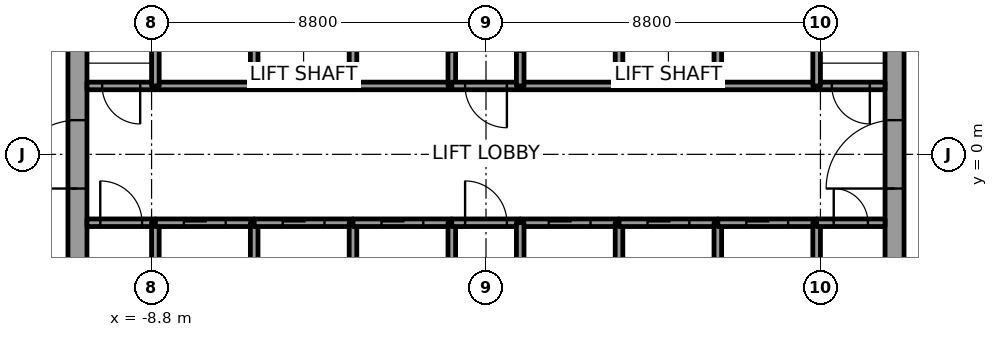
"""IFC4 building model, lengths in metres.
Left out: names, types, materials, properties, quantities, classifications, styles, units other than length and angle.
Written with IfcOpenShell. Run it as: python <this file> out.ifc"""

import sys

from ifc_helpers import new_model, si_unit, direction, frame, frame_2d, origin, place, context, subcontext, project, spatial, rectangle, extrude, element, fill, save


model = new_model("IFC4")
c1 = context("Model", 3, precision=1e-05, world=origin(), true_north=direction((0.0, 1.0)))
c2 = subcontext(c1, "Body", "Model", "MODEL_VIEW")
j1 = project(units=[si_unit("LENGTHUNIT", "METRE"), si_unit("PLANEANGLEUNIT", "RADIAN")], contexts=[c1])
p1 = place(None, origin())
s1 = spatial("IfcSite", under=j1, at=p1, CompositionType="ELEMENT")
p2 = place(p1, origin())
s2 = spatial("IfcBuilding", under=s1, at=p2, CompositionType="ELEMENT")
p3 = place(p2, frame((0.0, 0.0, 181.8)))
s3 = spatial("IfcBuildingStorey", under=s2, at=p3, CompositionType="ELEMENT", Elevation=181.8)
p4 = place(p3, frame((-10.75, -7.5, 0.0), z_axis=(0.0, 0.0, 1.0), x_axis=(0.0, 1.0, 0.0)))
e1 = element("IfcWall", 1, at=p4, inside=s3, PredefinedType="SHEAR", context=c2, shape_type="SweptSolid", body=[
    extrude(rectangle(XDim=15.0, YDim=0.5, at=frame_2d((7.5, 0.0))), origin(), (0.0, 0.0, 1.0), 4.0),
])
p5 = place(p4, frame((6.6, 0.0, 0.0)))
e2 = element("IfcOpeningElement", 2, at=p5, cuts=e1, PredefinedType="OPENING", context=c2, shape_type="SweptSolid", body=[
    extrude(rectangle(XDim=1.8, YDim=2.1, at=frame_2d((0.9, 1.05))), frame((0.0, 0.25, 0.0), z_axis=(0.0, -1.0, 0.0), x_axis=(1.0, 0.0, 0.0)), (0.0, 0.0, 1.0), 0.5),
])
p6 = place(p3, frame((10.75, -7.5, 0.0), z_axis=(0.0, 0.0, 1.0), x_axis=(0.0, 1.0, 0.0)))
e3 = element("IfcWall", 3, at=p6, inside=s3, PredefinedType="SHEAR", context=c2, shape_type="SweptSolid", body=[
    extrude(rectangle(XDim=15.0, YDim=0.5, at=frame_2d((7.5, 0.0))), origin(), (0.0, 0.0, 1.0), 4.0),
])
p7 = place(p6, frame((6.6, 0.0, 0.0)))
e4 = element("IfcOpeningElement", 4, at=p7, cuts=e3, PredefinedType="OPENING", context=c2, shape_type="SweptSolid", body=[
    extrude(rectangle(XDim=1.8, YDim=2.1, at=frame_2d((0.9, 1.05))), frame((0.0, 0.25, 0.0), z_axis=(0.0, -1.0, 0.0), x_axis=(1.0, 0.0, 0.0)), (0.0, 0.0, 1.0), 0.5),
])
p8 = place(p3, frame((-10.5, -1.8, 0.0), z_axis=(0.0, 0.0, 1.0), x_axis=(1.0, 0.0, 0.0)))
e5 = element("IfcWall", 5, at=p8, inside=s3, PredefinedType="SOLIDWALL", context=c2, shape_type="SweptSolid", body=[
    extrude(rectangle(XDim=1.8, YDim=0.2, at=frame_2d((0.9, 0.0))), origin(), (0.0, 0.0, 1.0), 3.85),
])
p9 = place(p8, frame((0.35, 0.0, 0.0)))
e6 = element("IfcOpeningElement", 6, at=p9, cuts=e5, PredefinedType="OPENING", context=c2, shape_type="SweptSolid", body=[
    extrude(rectangle(XDim=1.1, YDim=2.1, at=frame_2d((0.55, 1.05))), frame((0.0, 0.1, 0.0), z_axis=(0.0, -1.0, 0.0), x_axis=(1.0, 0.0, 0.0)), (0.0, 0.0, 1.0), 0.2),
])
p10 = place(p3, frame((-8.7, 1.8, 0.0), z_axis=(0.0, 0.0, 1.0), x_axis=(-1.0, 0.0, 0.0)))
e7 = element("IfcWall", 7, at=p10, inside=s3, PredefinedType="SOLIDWALL", context=c2, shape_type="SweptSolid", body=[
    extrude(rectangle(XDim=1.8, YDim=0.2, at=frame_2d((0.9, 0.0))), origin(), (0.0, 0.0, 1.0), 3.85),
])
p11 = place(p10, frame((0.4, 0.0, 0.0)))
e8 = element("IfcOpeningElement", 8, at=p11, cuts=e7, PredefinedType="OPENING", context=c2, shape_type="SweptSolid", body=[
    extrude(rectangle(XDim=1.0, YDim=2.1, at=frame_2d((0.5, 1.05))), frame((0.0, 0.1, 0.0), z_axis=(0.0, -1.0, 0.0), x_axis=(1.0, 0.0, 0.0)), (0.0, 0.0, 1.0), 0.2),
])
p12 = place(p3, frame((-8.7, -4.6, 0.0), z_axis=(0.0, 0.0, 1.0), x_axis=(0.0, 1.0, 0.0)))
e9 = element("IfcWall", 9, at=p12, inside=s3, PredefinedType="SOLIDWALL", context=c2, shape_type="SweptSolid", body=[
    extrude(rectangle(XDim=2.8, YDim=0.2, at=frame_2d((1.4, 0.0))), origin(), (0.0, 0.0, 1.0), 3.85),
])
p13 = place(p3, frame((-8.7, -1.8, 0.0), z_axis=(0.0, 0.0, 1.0), x_axis=(1.0, 0.0, 0.0)))
e10 = element("IfcWall", 10, at=p13, inside=s3, PredefinedType="SOLIDWALL", context=c2, shape_type="SweptSolid", body=[
    extrude(rectangle(XDim=2.6, YDim=0.2, at=frame_2d((1.3, 0.0))), origin(), (0.0, 0.0, 1.0), 3.85),
])
p14 = place(p13, frame((0.75, 0.0, 0.0)))
e11 = element("IfcOpeningElement", 11, at=p14, cuts=e10, PredefinedType="OPENING", context=c2, shape_type="SweptSolid", body=[
    extrude(rectangle(XDim=1.1, YDim=2.1, at=frame_2d((0.55, 1.05))), frame((0.0, 0.1, 0.0), z_axis=(0.0, -1.0, 0.0), x_axis=(1.0, 0.0, 0.0)), (0.0, 0.0, 1.0), 0.2),
])
p15 = place(p3, frame((-6.1, 1.8, 0.0), z_axis=(0.0, 0.0, 1.0), x_axis=(-1.0, 0.0, 0.0)))
e12 = element("IfcWall", 12, at=p15, inside=s3, PredefinedType="SOLIDWALL", context=c2, shape_type="SweptSolid", body=[
    extrude(rectangle(XDim=2.6, YDim=0.2, at=frame_2d((1.3, 0.0))), origin(), (0.0, 0.0, 1.0), 3.85),
])
for number, where, z_axis, x_axis in (
    (13, (-8.7, 1.8, 0.0), (0.0, 0.0, 1.0), (0.0, 1.0, 0.0)),
    (14, (-6.1, -4.6, 0.0), (0.0, 0.0, 1.0), (0.0, 1.0, 0.0)),
):
    element("IfcWall", number, at=place(p3, frame(where, z_axis=z_axis, x_axis=x_axis)), inside=s3, PredefinedType="SOLIDWALL", context=c2, shape_type="SweptSolid", body=[
        extrude(rectangle(XDim=2.8, YDim=0.2, at=frame_2d((1.4, 0.0))), origin(), (0.0, 0.0, 1.0), 3.85),
    ])
p16 = place(p3, frame((-6.1, -1.8, 0.0), z_axis=(0.0, 0.0, 1.0), x_axis=(1.0, 0.0, 0.0)))
e15 = element("IfcWall", 15, at=p16, inside=s3, PredefinedType="SOLIDWALL", context=c2, shape_type="SweptSolid", body=[
    extrude(rectangle(XDim=2.6, YDim=0.2, at=frame_2d((1.3, 0.0))), origin(), (0.0, 0.0, 1.0), 3.85),
])
p17 = place(p16, frame((0.75, 0.0, 0.0)))
e16 = element("IfcOpeningElement", 16, at=p17, cuts=e15, PredefinedType="OPENING", context=c2, shape_type="SweptSolid", body=[
    extrude(rectangle(XDim=1.1, YDim=2.1, at=frame_2d((0.55, 1.05))), frame((0.0, 0.1, 0.0), z_axis=(0.0, -1.0, 0.0), x_axis=(1.0, 0.0, 0.0)), (0.0, 0.0, 1.0), 0.2),
])
p18 = place(p3, frame((-3.5, 1.8, 0.0), z_axis=(0.0, 0.0, 1.0), x_axis=(-1.0, 0.0, 0.0)))
e17 = element("IfcWall", 17, at=p18, inside=s3, PredefinedType="SOLIDWALL", context=c2, shape_type="SweptSolid", body=[
    extrude(rectangle(XDim=2.6, YDim=0.2, at=frame_2d((1.3, 0.0))), origin(), (0.0, 0.0, 1.0), 3.85),
])
for number, where, z_axis, x_axis in (
    (18, (-6.1, 1.8, 0.0), (0.0, 0.0, 1.0), (0.0, 1.0, 0.0)),
    (19, (-3.5, -4.6, 0.0), (0.0, 0.0, 1.0), (0.0, 1.0, 0.0)),
):
    element("IfcWall", number, at=place(p3, frame(where, z_axis=z_axis, x_axis=x_axis)), inside=s3, PredefinedType="SOLIDWALL", context=c2, shape_type="SweptSolid", body=[
        extrude(rectangle(XDim=2.8, YDim=0.2, at=frame_2d((1.4, 0.0))), origin(), (0.0, 0.0, 1.0), 3.85),
    ])
p19 = place(p3, frame((-3.5, -1.8, 0.0), z_axis=(0.0, 0.0, 1.0), x_axis=(1.0, 0.0, 0.0)))
e20 = element("IfcWall", 20, at=p19, inside=s3, PredefinedType="SOLIDWALL", context=c2, shape_type="SweptSolid", body=[
    extrude(rectangle(XDim=2.6, YDim=0.2, at=frame_2d((1.3, 0.0))), origin(), (0.0, 0.0, 1.0), 3.85),
])
p20 = place(p19, frame((0.75, 0.0, 0.0)))
e21 = element("IfcOpeningElement", 21, at=p20, cuts=e20, PredefinedType="OPENING", context=c2, shape_type="SweptSolid", body=[
    extrude(rectangle(XDim=1.1, YDim=2.1, at=frame_2d((0.55, 1.05))), frame((0.0, 0.1, 0.0), z_axis=(0.0, -1.0, 0.0), x_axis=(1.0, 0.0, 0.0)), (0.0, 0.0, 1.0), 0.2),
])
p21 = place(p3, frame((-0.9, 1.8, 0.0), z_axis=(0.0, 0.0, 1.0), x_axis=(-1.0, 0.0, 0.0)))
e22 = element("IfcWall", 22, at=p21, inside=s3, PredefinedType="SOLIDWALL", context=c2, shape_type="SweptSolid", body=[
    extrude(rectangle(XDim=2.6, YDim=0.2, at=frame_2d((1.3, 0.0))), origin(), (0.0, 0.0, 1.0), 3.85),
])
p22 = place(p3, frame((-3.5, 4.6, 0.0), z_axis=(0.0, 0.0, 1.0), x_axis=(0.0, -1.0, 0.0)))
e23 = element("IfcWall", 23, at=p22, inside=s3, PredefinedType="SOLIDWALL", context=c2, shape_type="SweptSolid", body=[
    extrude(rectangle(XDim=2.8, YDim=0.2, at=frame_2d((1.4, 0.0))), origin(), (0.0, 0.0, 1.0), 3.85),
])
p23 = place(p3, frame((-0.9, 1.8, 0.0), z_axis=(0.0, 0.0, 1.0), x_axis=(0.0, 1.0, 0.0)))
e24 = element("IfcWall", 24, at=p23, inside=s3, PredefinedType="SOLIDWALL", context=c2, shape_type="SweptSolid", body=[
    extrude(rectangle(XDim=3.0, YDim=0.2, at=frame_2d((1.5, 0.0))), origin(), (0.0, 0.0, 1.0), 3.85),
])
p24 = place(p23, frame((0.9, 0.0, 0.0)))
e25 = element("IfcOpeningElement", 25, at=p24, cuts=e24, PredefinedType="OPENING", context=c2, shape_type="SweptSolid", body=[
    extrude(rectangle(XDim=1.2, YDim=2.1, at=frame_2d((0.6, 1.05))), frame((0.0, 0.1, 0.0), z_axis=(0.0, -1.0, 0.0), x_axis=(1.0, 0.0, 0.0)), (0.0, 0.0, 1.0), 0.2),
])
p25 = place(p3, frame((-0.9, -4.6, 0.0), z_axis=(0.0, 0.0, 1.0), x_axis=(0.0, 1.0, 0.0)))
e26 = element("IfcWall", 26, at=p25, inside=s3, PredefinedType="SOLIDWALL", context=c2, shape_type="SweptSolid", body=[
    extrude(rectangle(XDim=2.8, YDim=0.2, at=frame_2d((1.4, 0.0))), origin(), (0.0, 0.0, 1.0), 3.85),
])
p26 = place(p3, frame((-0.9, -1.8, 0.0), z_axis=(0.0, 0.0, 1.0), x_axis=(1.0, 0.0, 0.0)))
e27 = element("IfcWall", 27, at=p26, inside=s3, PredefinedType="SOLIDWALL", context=c2, shape_type="SweptSolid", body=[
    extrude(rectangle(XDim=1.8, YDim=0.2, at=frame_2d((0.9, 0.0))), origin(), (0.0, 0.0, 1.0), 3.85),
])
p27 = place(p26, frame((0.35, 0.0, 0.0)))
e28 = element("IfcOpeningElement", 28, at=p27, cuts=e27, PredefinedType="OPENING", context=c2, shape_type="SweptSolid", body=[
    extrude(rectangle(XDim=1.1, YDim=2.1, at=frame_2d((0.55, 1.05))), frame((0.0, 0.1, 0.0), z_axis=(0.0, -1.0, 0.0), x_axis=(1.0, 0.0, 0.0)), (0.0, 0.0, 1.0), 0.2),
])
p28 = place(p3, frame((0.9, 1.8, 0.0), z_axis=(0.0, 0.0, 1.0), x_axis=(-1.0, 0.0, 0.0)))
e29 = element("IfcWall", 29, at=p28, inside=s3, PredefinedType="SOLIDWALL", context=c2, shape_type="SweptSolid", body=[
    extrude(rectangle(XDim=1.8, YDim=0.2, at=frame_2d((0.9, 0.0))), origin(), (0.0, 0.0, 1.0), 3.85),
])
p29 = place(p28, frame((0.35, 0.0, 0.0)))
e30 = element("IfcOpeningElement", 30, at=p29, cuts=e29, PredefinedType="OPENING", context=c2, shape_type="SweptSolid", body=[
    extrude(rectangle(XDim=1.1, YDim=2.1, at=frame_2d((0.55, 1.05))), frame((0.0, 0.1, 0.0), z_axis=(0.0, -1.0, 0.0), x_axis=(1.0, 0.0, 0.0)), (0.0, 0.0, 1.0), 0.2),
])
p30 = place(p3, frame((0.9, -1.8, 0.0), z_axis=(0.0, 0.0, 1.0), x_axis=(1.0, 0.0, 0.0)))
e31 = element("IfcWall", 31, at=p30, inside=s3, PredefinedType="SOLIDWALL", context=c2, shape_type="SweptSolid", body=[
    extrude(rectangle(XDim=2.6, YDim=0.2, at=frame_2d((1.3, 0.0))), origin(), (0.0, 0.0, 1.0), 3.85),
])
p31 = place(p30, frame((0.75, 0.0, 0.0)))
e32 = element("IfcOpeningElement", 32, at=p31, cuts=e31, PredefinedType="OPENING", context=c2, shape_type="SweptSolid", body=[
    extrude(rectangle(XDim=1.1, YDim=2.1, at=frame_2d((0.55, 1.05))), frame((0.0, 0.1, 0.0), z_axis=(0.0, -1.0, 0.0), x_axis=(1.0, 0.0, 0.0)), (0.0, 0.0, 1.0), 0.2),
])
p32 = place(p3, frame((0.9, -1.8, 0.0), z_axis=(0.0, 0.0, 1.0), x_axis=(0.0, -1.0, 0.0)))
e33 = element("IfcWall", 33, at=p32, inside=s3, PredefinedType="SOLIDWALL", context=c2, shape_type="SweptSolid", body=[
    extrude(rectangle(XDim=2.8, YDim=0.2, at=frame_2d((1.4, 0.0))), origin(), (0.0, 0.0, 1.0), 3.85),
])
p33 = place(p3, frame((3.5, 1.8, 0.0), z_axis=(0.0, 0.0, 1.0), x_axis=(-1.0, 0.0, 0.0)))
e34 = element("IfcWall", 34, at=p33, inside=s3, PredefinedType="SOLIDWALL", context=c2, shape_type="SweptSolid", body=[
    extrude(rectangle(XDim=2.6, YDim=0.2, at=frame_2d((1.3, 0.0))), origin(), (0.0, 0.0, 1.0), 3.85),
])
p34 = place(p3, frame((0.9, 4.8, 0.0), z_axis=(0.0, 0.0, 1.0), x_axis=(0.0, -1.0, 0.0)))
e35 = element("IfcWall", 35, at=p34, inside=s3, PredefinedType="SOLIDWALL", context=c2, shape_type="SweptSolid", body=[
    extrude(rectangle(XDim=3.0, YDim=0.2, at=frame_2d((1.5, 0.0))), origin(), (0.0, 0.0, 1.0), 3.85),
])
p35 = place(p34, frame((0.9, 0.0, 0.0)))
e36 = element("IfcOpeningElement", 36, at=p35, cuts=e35, PredefinedType="OPENING", context=c2, shape_type="SweptSolid", body=[
    extrude(rectangle(XDim=1.2, YDim=2.1, at=frame_2d((0.6, 1.05))), frame((0.0, 0.1, 0.0), z_axis=(0.0, -1.0, 0.0), x_axis=(1.0, 0.0, 0.0)), (0.0, 0.0, 1.0), 0.2),
])
p36 = place(p3, frame((3.5, -4.6, 0.0), z_axis=(0.0, 0.0, 1.0), x_axis=(0.0, 1.0, 0.0)))
e37 = element("IfcWall", 37, at=p36, inside=s3, PredefinedType="SOLIDWALL", context=c2, shape_type="SweptSolid", body=[
    extrude(rectangle(XDim=2.8, YDim=0.2, at=frame_2d((1.4, 0.0))), origin(), (0.0, 0.0, 1.0), 3.85),
])
p37 = place(p3, frame((3.5, -1.8, 0.0), z_axis=(0.0, 0.0, 1.0), x_axis=(1.0, 0.0, 0.0)))
e38 = element("IfcWall", 38, at=p37, inside=s3, PredefinedType="SOLIDWALL", context=c2, shape_type="SweptSolid", body=[
    extrude(rectangle(XDim=2.6, YDim=0.2, at=frame_2d((1.3, 0.0))), origin(), (0.0, 0.0, 1.0), 3.85),
])
p38 = place(p37, frame((0.75, 0.0, 0.0)))
e39 = element("IfcOpeningElement", 39, at=p38, cuts=e38, PredefinedType="OPENING", context=c2, shape_type="SweptSolid", body=[
    extrude(rectangle(XDim=1.1, YDim=2.1, at=frame_2d((0.55, 1.05))), frame((0.0, 0.1, 0.0), z_axis=(0.0, -1.0, 0.0), x_axis=(1.0, 0.0, 0.0)), (0.0, 0.0, 1.0), 0.2),
])
p39 = place(p3, frame((6.1, 1.8, 0.0), z_axis=(0.0, 0.0, 1.0), x_axis=(-1.0, 0.0, 0.0)))
e40 = element("IfcWall", 40, at=p39, inside=s3, PredefinedType="SOLIDWALL", context=c2, shape_type="SweptSolid", body=[
    extrude(rectangle(XDim=2.6, YDim=0.2, at=frame_2d((1.3, 0.0))), origin(), (0.0, 0.0, 1.0), 3.85),
])
for number, where, z_axis, x_axis in (
    (41, (3.5, 1.8, 0.0), (0.0, 0.0, 1.0), (0.0, 1.0, 0.0)),
    (42, (6.1, -4.6, 0.0), (0.0, 0.0, 1.0), (0.0, 1.0, 0.0)),
):
    element("IfcWall", number, at=place(p3, frame(where, z_axis=z_axis, x_axis=x_axis)), inside=s3, PredefinedType="SOLIDWALL", context=c2, shape_type="SweptSolid", body=[
        extrude(rectangle(XDim=2.8, YDim=0.2, at=frame_2d((1.4, 0.0))), origin(), (0.0, 0.0, 1.0), 3.85),
    ])
p40 = place(p3, frame((6.1, -1.8, 0.0), z_axis=(0.0, 0.0, 1.0), x_axis=(1.0, 0.0, 0.0)))
e43 = element("IfcWall", 43, at=p40, inside=s3, PredefinedType="SOLIDWALL", context=c2, shape_type="SweptSolid", body=[
    extrude(rectangle(XDim=2.6, YDim=0.2, at=frame_2d((1.3, 0.0))), origin(), (0.0, 0.0, 1.0), 3.85),
])
p41 = place(p40, frame((0.75, 0.0, 0.0)))
e44 = element("IfcOpeningElement", 44, at=p41, cuts=e43, PredefinedType="OPENING", context=c2, shape_type="SweptSolid", body=[
    extrude(rectangle(XDim=1.1, YDim=2.1, at=frame_2d((0.55, 1.05))), frame((0.0, 0.1, 0.0), z_axis=(0.0, -1.0, 0.0), x_axis=(1.0, 0.0, 0.0)), (0.0, 0.0, 1.0), 0.2),
])
p42 = place(p3, frame((8.7, 1.8, 0.0), z_axis=(0.0, 0.0, 1.0), x_axis=(-1.0, 0.0, 0.0)))
e45 = element("IfcWall", 45, at=p42, inside=s3, PredefinedType="SOLIDWALL", context=c2, shape_type="SweptSolid", body=[
    extrude(rectangle(XDim=2.6, YDim=0.2, at=frame_2d((1.3, 0.0))), origin(), (0.0, 0.0, 1.0), 3.85),
])
for number, where, z_axis, x_axis in (
    (46, (6.1, 1.8, 0.0), (0.0, 0.0, 1.0), (0.0, 1.0, 0.0)),
    (47, (8.7, -1.8, 0.0), (0.0, 0.0, 1.0), (0.0, -1.0, 0.0)),
):
    element("IfcWall", number, at=place(p3, frame(where, z_axis=z_axis, x_axis=x_axis)), inside=s3, PredefinedType="SOLIDWALL", context=c2, shape_type="SweptSolid", body=[
        extrude(rectangle(XDim=2.8, YDim=0.2, at=frame_2d((1.4, 0.0))), origin(), (0.0, 0.0, 1.0), 3.85),
    ])
p43 = place(p3, frame((8.7, -1.8, 0.0), z_axis=(0.0, 0.0, 1.0), x_axis=(1.0, 0.0, 0.0)))
e48 = element("IfcWall", 48, at=p43, inside=s3, PredefinedType="SOLIDWALL", context=c2, shape_type="SweptSolid", body=[
    extrude(rectangle(XDim=1.8, YDim=0.2, at=frame_2d((0.9, 0.0))), origin(), (0.0, 0.0, 1.0), 3.85),
])
p44 = place(p43, frame((0.45, 0.0, 0.0)))
e49 = element("IfcOpeningElement", 49, at=p44, cuts=e48, PredefinedType="OPENING", context=c2, shape_type="SweptSolid", body=[
    extrude(rectangle(XDim=0.9, YDim=2.1, at=frame_2d((0.45, 1.05))), frame((0.0, 0.1, 0.0), z_axis=(0.0, -1.0, 0.0), x_axis=(1.0, 0.0, 0.0)), (0.0, 0.0, 1.0), 0.2),
])
p45 = place(p3, frame((10.5, 1.8, 0.0), z_axis=(0.0, 0.0, 1.0), x_axis=(-1.0, 0.0, 0.0)))
e50 = element("IfcWall", 50, at=p45, inside=s3, PredefinedType="SOLIDWALL", context=c2, shape_type="SweptSolid", body=[
    extrude(rectangle(XDim=1.8, YDim=0.2, at=frame_2d((0.9, 0.0))), origin(), (0.0, 0.0, 1.0), 3.85),
])
p46 = place(p45, frame((0.4, 0.0, 0.0)))
e51 = element("IfcOpeningElement", 51, at=p46, cuts=e50, PredefinedType="OPENING", context=c2, shape_type="SweptSolid", body=[
    extrude(rectangle(XDim=1.0, YDim=2.1, at=frame_2d((0.5, 1.05))), frame((0.0, 0.1, 0.0), z_axis=(0.0, -1.0, 0.0), x_axis=(1.0, 0.0, 0.0)), (0.0, 0.0, 1.0), 0.2),
])
p47 = place(p3, frame((8.7, 4.6, 0.0), z_axis=(0.0, 0.0, 1.0), x_axis=(0.0, -1.0, 0.0)))
e52 = element("IfcWall", 52, at=p47, inside=s3, PredefinedType="SOLIDWALL", context=c2, shape_type="SweptSolid", body=[
    extrude(rectangle(XDim=2.8, YDim=0.2, at=frame_2d((1.4, 0.0))), origin(), (0.0, 0.0, 1.0), 3.85),
])
p48 = place(p14, origin())
e53 = element("IfcDoor", 53, at=p48, inside=s3, OperationType="SLIDING_TO_LEFT", PredefinedType="DOOR", context=c2, shape_type="SweptSolid", body=[
    extrude(rectangle(XDim=1.1, YDim=2.1, at=frame_2d((0.55, 1.05))), frame((0.0, 0.025, 0.0), z_axis=(0.0, -1.0, 0.0), x_axis=(1.0, 0.0, 0.0)), (0.0, 0.0, 1.0), 0.05),
])
fill(e11, e53)
p49 = place(p17, origin())
e54 = element("IfcDoor", 54, at=p49, inside=s3, OperationType="SLIDING_TO_LEFT", PredefinedType="DOOR", context=c2, shape_type="SweptSolid", body=[
    extrude(rectangle(XDim=1.1, YDim=2.1, at=frame_2d((0.55, 1.05))), frame((0.0, 0.025, 0.0), z_axis=(0.0, -1.0, 0.0), x_axis=(1.0, 0.0, 0.0)), (0.0, 0.0, 1.0), 0.05),
])
fill(e16, e54)
p50 = place(p20, origin())
e55 = element("IfcDoor", 55, at=p50, inside=s3, OperationType="SLIDING_TO_RIGHT", PredefinedType="DOOR", context=c2, shape_type="SweptSolid", body=[
    extrude(rectangle(XDim=1.1, YDim=2.1, at=frame_2d((0.55, 1.05))), frame((0.0, 0.025, 0.0), z_axis=(0.0, -1.0, 0.0), x_axis=(1.0, 0.0, 0.0)), (0.0, 0.0, 1.0), 0.05),
])
fill(e21, e55)
p51 = place(p31, origin())
e56 = element("IfcDoor", 56, at=p51, inside=s3, OperationType="SLIDING_TO_LEFT", PredefinedType="DOOR", context=c2, shape_type="SweptSolid", body=[
    extrude(rectangle(XDim=1.1, YDim=2.1, at=frame_2d((0.55, 1.05))), frame((0.0, 0.025, 0.0), z_axis=(0.0, -1.0, 0.0), x_axis=(1.0, 0.0, 0.0)), (0.0, 0.0, 1.0), 0.05),
])
fill(e32, e56)
p52 = place(p38, origin())
e57 = element("IfcDoor", 57, at=p52, inside=s3, OperationType="SLIDING_TO_LEFT", PredefinedType="DOOR", context=c2, shape_type="SweptSolid", body=[
    extrude(rectangle(XDim=1.1, YDim=2.1, at=frame_2d((0.55, 1.05))), frame((0.0, 0.025, 0.0), z_axis=(0.0, -1.0, 0.0), x_axis=(1.0, 0.0, 0.0)), (0.0, 0.0, 1.0), 0.05),
])
fill(e39, e57)
p53 = place(p41, origin())
e58 = element("IfcDoor", 58, at=p53, inside=s3, OperationType="SLIDING_TO_LEFT", PredefinedType="DOOR", context=c2, shape_type="SweptSolid", body=[
    extrude(rectangle(XDim=1.1, YDim=2.1, at=frame_2d((0.55, 1.05))), frame((0.0, 0.025, 0.0), z_axis=(0.0, -1.0, 0.0), x_axis=(1.0, 0.0, 0.0)), (0.0, 0.0, 1.0), 0.05),
])
fill(e44, e58)
p54 = place(p9, origin())
e59 = element("IfcDoor", 59, at=p54, inside=s3, OperationType="SINGLE_SWING_LEFT", PredefinedType="DOOR", context=c2, shape_type="SweptSolid", body=[
    extrude(rectangle(XDim=1.1, YDim=2.1, at=frame_2d((0.55, 1.05))), frame((0.0, 0.025, 0.0), z_axis=(0.0, -1.0, 0.0), x_axis=(1.0, 0.0, 0.0)), (0.0, 0.0, 1.0), 0.05),
])
fill(e6, e59)
p55 = place(p29, origin())
e60 = element("IfcDoor", 60, at=p55, inside=s3, OperationType="SINGLE_SWING_LEFT", PredefinedType="DOOR", context=c2, shape_type="SweptSolid", body=[
    extrude(rectangle(XDim=1.1, YDim=2.1, at=frame_2d((0.55, 1.05))), frame((0.0, 0.025, 0.0), z_axis=(0.0, -1.0, 0.0), x_axis=(1.0, 0.0, 0.0)), (0.0, 0.0, 1.0), 0.05),
])
fill(e30, e60)
p56 = place(p27, origin())
e61 = element("IfcDoor", 61, at=p56, inside=s3, OperationType="SINGLE_SWING_LEFT", PredefinedType="DOOR", context=c2, shape_type="SweptSolid", body=[
    extrude(rectangle(XDim=1.1, YDim=2.1, at=frame_2d((0.55, 1.05))), frame((0.0, 0.025, 0.0), z_axis=(0.0, -1.0, 0.0), x_axis=(1.0, 0.0, 0.0)), (0.0, 0.0, 1.0), 0.05),
])
fill(e28, e61)
p57 = place(p11, origin())
e62 = element("IfcDoor", 62, at=p57, inside=s3, OperationType="SINGLE_SWING_RIGHT", PredefinedType="DOOR", context=c2, shape_type="SweptSolid", body=[
    extrude(rectangle(XDim=1.0, YDim=2.1, at=frame_2d((0.5, 1.05))), frame((0.0, 0.025, 0.0), z_axis=(0.0, -1.0, 0.0), x_axis=(1.0, 0.0, 0.0)), (0.0, 0.0, 1.0), 0.05),
])
fill(e8, e62)
p58 = place(p46, origin())
e63 = element("IfcDoor", 63, at=p58, inside=s3, OperationType="SINGLE_SWING_LEFT", PredefinedType="DOOR", context=c2, shape_type="SweptSolid", body=[
    extrude(rectangle(XDim=1.0, YDim=2.1, at=frame_2d((0.5, 1.05))), frame((0.0, 0.025, 0.0), z_axis=(0.0, -1.0, 0.0), x_axis=(1.0, 0.0, 0.0)), (0.0, 0.0, 1.0), 0.05),
])
fill(e51, e63)
p59 = place(p44, origin())
e64 = element("IfcDoor", 64, at=p59, inside=s3, OperationType="SINGLE_SWING_LEFT", PredefinedType="DOOR", context=c2, shape_type="SweptSolid", body=[
    extrude(rectangle(XDim=0.9, YDim=2.1, at=frame_2d((0.45, 1.05))), frame((0.0, 0.025, 0.0), z_axis=(0.0, -1.0, 0.0), x_axis=(1.0, 0.0, 0.0)), (0.0, 0.0, 1.0), 0.05),
])
fill(e49, e64)
p60 = place(p5, origin())
e65 = element("IfcDoor", 65, at=p60, inside=s3, OperationType="DOUBLE_DOOR_SINGLE_SWING", PredefinedType="DOOR", context=c2, shape_type="SweptSolid", body=[
    extrude(rectangle(XDim=1.8, YDim=2.1, at=frame_2d((0.9, 1.05))), frame((0.0, 0.025, 0.0), z_axis=(0.0, -1.0, 0.0), x_axis=(1.0, 0.0, 0.0)), (0.0, 0.0, 1.0), 0.05),
])
fill(e2, e65)
p61 = place(p7, origin())
e66 = element("IfcDoor", 66, at=p61, inside=s3, OperationType="DOUBLE_DOOR_SINGLE_SWING", PredefinedType="DOOR", context=c2, shape_type="SweptSolid", body=[
    extrude(rectangle(XDim=1.8, YDim=2.1, at=frame_2d((0.9, 1.05))), frame((0.0, 0.025, 0.0), z_axis=(0.0, -1.0, 0.0), x_axis=(1.0, 0.0, 0.0)), (0.0, 0.0, 1.0), 0.05),
])
fill(e4, e66)
save(model, sys.argv[1])
